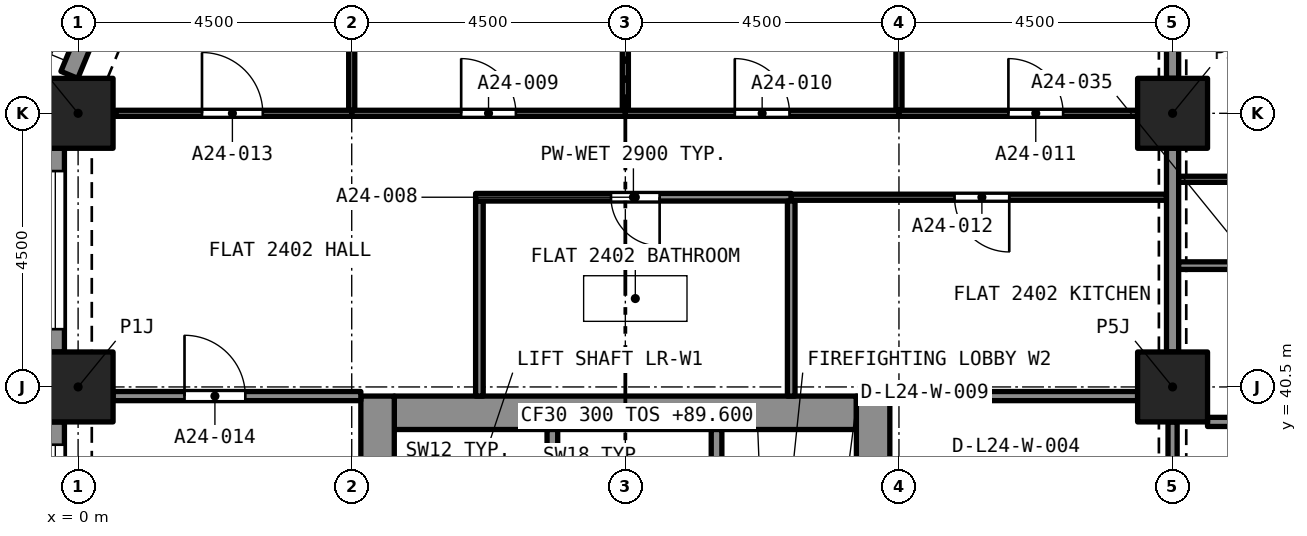
"""IFC4 building model, lengths in metres.
Left out: names, types, materials, properties, quantities, classifications, styles, units other than length and angle.
Written with IfcOpenShell. Run it as: python <this file> out.ifc"""

import sys

from ifc_helpers import new_model, si_unit, direction, frame, frame_2d, origin, origin_2d, place, context, subcontext, project, spatial, rectangle, extrude, element, fill, save


model = new_model("IFC4")
c1 = context("Model", 3, precision=1e-05, world=origin(), true_north=direction((0.0, 1.0)))
c2 = subcontext(c1, "Body", "Model", "MODEL_VIEW")
j1 = project(units=[si_unit("LENGTHUNIT", "METRE"), si_unit("PLANEANGLEUNIT", "RADIAN")], contexts=[c1])
p1 = place(None, origin())
s1 = spatial("IfcSite", under=j1, at=p1, CompositionType="ELEMENT")
p2 = place(p1, origin())
s2 = spatial("IfcBuilding", under=s1, at=p2, CompositionType="ELEMENT")
p3 = place(p2, frame((0.0, 0.0, 89.6)))
s3 = spatial("IfcBuildingStorey", under=s2, at=p3, CompositionType="ELEMENT", Elevation=89.6)
for number, where, z_axis, x_axis in (
    (1, (0.0, 40.5, 0.0), (0.0, 0.0, 1.0), (1.0, 0.0, 0.0)),
    (2, (18.0, 40.5, 0.0), (0.0, 0.0, 1.0), (1.0, 0.0, 0.0)),
    (3, (0.0, 45.0, 0.0), (0.0, 0.0, 1.0), (1.0, 0.0, 0.0)),
    (4, (18.0, 45.0, 0.0), (0.0, 0.0, 1.0), (1.0, 0.0, 0.0)),
):
    element("IfcColumn", number, at=place(p3, frame(where, z_axis=z_axis, x_axis=x_axis)), inside=s3, PredefinedType="COLUMN", context=c2, shape_type="SweptSolid", body=[
        extrude(rectangle(XDim=1.15, YDim=1.15, at=origin_2d()), origin(), (0.0, 0.0, 1.0), 3.2),
    ])
p4 = place(p3, frame((5.2, 40.075, 0.0), z_axis=(0.0, 0.0, 1.0), x_axis=(1.0, 0.0, 0.0)))
e5 = element("IfcWall", 5, at=p4, inside=s3, PredefinedType="SOLIDWALL", context=c2, shape_type="SweptSolid", body=[
    extrude(rectangle(XDim=7.6, YDim=0.55, at=frame_2d((3.8, 0.0))), origin(), (0.0, 0.0, 1.0), 3.2),
])
p5 = place(p3, frame((4.925, 27.15, 0.0), z_axis=(0.0, 0.0, 1.0), x_axis=(0.0, 1.0, 0.0)))
e6 = element("IfcWall", 6, at=p5, inside=s3, PredefinedType="SOLIDWALL", context=c2, shape_type="SweptSolid", body=[
    extrude(rectangle(XDim=13.2, YDim=0.55, at=frame_2d((6.6, 0.0))), origin(), (0.0, 0.0, 1.0), 3.2),
])
p6 = place(p5, frame((8.8, 0.0, 0.0)))
e7 = element("IfcOpeningElement", 7, at=p6, cuts=e6, PredefinedType="OPENING", context=c2, shape_type="SweptSolid", body=[
    extrude(rectangle(XDim=1.2, YDim=2.1, at=frame_2d((0.6, 1.05))), frame((0.0, 0.285, 0.0), z_axis=(0.0, -1.0, 0.0), x_axis=(1.0, 0.0, 0.0)), (0.0, 0.0, 1.0), 0.57),
])
p7 = place(p3, frame((13.075, 27.15, 0.0), z_axis=(0.0, 0.0, 1.0), x_axis=(0.0, 1.0, 0.0)))
e8 = element("IfcWall", 8, at=p7, inside=s3, PredefinedType="SOLIDWALL", context=c2, shape_type="SweptSolid", body=[
    extrude(rectangle(XDim=13.2, YDim=0.55, at=frame_2d((6.6, 0.0))), origin(), (0.0, 0.0, 1.0), 3.2),
])
p8 = place(p7, frame((10.95, 0.0, 0.0)))
e9 = element("IfcOpeningElement", 9, at=p8, cuts=e8, PredefinedType="OPENING", context=c2, shape_type="SweptSolid", body=[
    extrude(rectangle(XDim=1.1, YDim=2.1, at=frame_2d((0.55, 1.05))), frame((0.0, 0.285, 0.0), z_axis=(0.0, -1.0, 0.0), x_axis=(1.0, 0.0, 0.0)), (0.0, 0.0, 1.0), 0.57),
])
p9 = place(p7, frame((8.8, 0.0, 0.0)))
e10 = element("IfcOpeningElement", 10, at=p9, cuts=e8, PredefinedType="OPENING", context=c2, shape_type="SweptSolid", body=[
    extrude(rectangle(XDim=1.2, YDim=2.1, at=frame_2d((0.6, 1.05))), frame((0.0, 0.285, 0.0), z_axis=(0.0, -1.0, 0.0), x_axis=(1.0, 0.0, 0.0)), (0.0, 0.0, 1.0), 0.57),
])
p10 = place(p3, frame((-0.144, 45.632, 0.0), z_axis=(0.0, 0.0, 1.0), x_axis=(0.382723818695, 0.923862802911, 0.0)))
e11 = element("IfcWall", 11, at=p10, inside=s3, PredefinedType="SOLIDWALL", context=c2, shape_type="SweptSolid", body=[
    extrude(rectangle(XDim=2.164, YDim=0.3, at=frame_2d((1.082, 0.0))), origin(), (0.0, 0.0, 1.0), 3.2),
])
p11 = place(p10, frame((0.493, 0.0, 0.45)))
e12 = element("IfcOpeningElement", 12, at=p11, cuts=e11, PredefinedType="OPENING", context=c2, shape_type="SweptSolid", body=[
    extrude(rectangle(XDim=1.4, YDim=1.95, at=frame_2d((0.7, 0.975))), frame((0.0, 0.16, 0.0), z_axis=(0.0, -1.0, 0.0), x_axis=(1.0, 0.0, 0.0)), (0.0, 0.0, 1.0), 0.32),
])
p12 = place(p3, frame((-0.375, 41.075, 0.0), z_axis=(0.0, 0.0, 1.0), x_axis=(0.0, 1.0, 0.0)))
e13 = element("IfcWall", 13, at=p12, inside=s3, PredefinedType="SOLIDWALL", context=c2, shape_type="SweptSolid", body=[
    extrude(rectangle(XDim=3.35, YDim=0.3, at=frame_2d((1.675, 0.0))), origin(), (0.0, 0.0, 1.0), 3.2),
])
p13 = place(p12, frame((0.375, 0.0, 0.45)))
e14 = element("IfcOpeningElement", 14, at=p13, cuts=e13, PredefinedType="OPENING", context=c2, shape_type="SweptSolid", body=[
    extrude(rectangle(XDim=2.6, YDim=1.95, at=frame_2d((1.3, 0.975))), frame((0.0, 0.16, 0.0), z_axis=(0.0, -1.0, 0.0), x_axis=(1.0, 0.0, 0.0)), (0.0, 0.0, 1.0), 0.32),
])
p14 = place(p3, frame((-0.375, 36.575, 0.0), z_axis=(0.0, 0.0, 1.0), x_axis=(0.0, 1.0, 0.0)))
e15 = element("IfcWall", 15, at=p14, inside=s3, PredefinedType="SOLIDWALL", context=c2, shape_type="SweptSolid", body=[
    extrude(rectangle(XDim=3.35, YDim=0.3, at=frame_2d((1.675, 0.0))), origin(), (0.0, 0.0, 1.0), 3.2),
])
p15 = place(p14, frame((0.375, 0.0, 0.45)))
e16 = element("IfcOpeningElement", 16, at=p15, cuts=e15, PredefinedType="OPENING", context=c2, shape_type="SweptSolid", body=[
    extrude(rectangle(XDim=2.6, YDim=1.95, at=frame_2d((1.3, 0.975))), frame((0.0, 0.16, 0.0), z_axis=(0.0, -1.0, 0.0), x_axis=(1.0, 0.0, 0.0)), (0.0, 0.0, 1.0), 0.32),
])
p16 = place(p3, frame((6.6, 40.35, 0.0), z_axis=(0.0, 0.0, 1.0), x_axis=(0.0, 1.0, 0.0)))
e17 = element("IfcWall", 17, at=p16, inside=s3, PredefinedType="PARTITIONING", context=c2, shape_type="SweptSolid", body=[
    extrude(rectangle(XDim=3.208, YDim=0.125, at=frame_2d((1.604, 0.0))), origin(), (0.0, 0.0, 1.0), 2.9),
])
p17 = place(p3, frame((11.728, 43.62, 0.0), z_axis=(0.0, 0.0, 1.0), x_axis=(-1.0, 0.0, 0.0)))
e18 = element("IfcWall", 18, at=p17, inside=s3, PredefinedType="PARTITIONING", context=c2, shape_type="SweptSolid", body=[
    extrude(rectangle(XDim=5.19, YDim=0.125, at=frame_2d((2.595, 0.0))), origin(), (0.0, 0.0, 1.0), 2.9),
])
p18 = place(p17, frame((2.164, 0.0, 0.0)))
e19 = element("IfcOpeningElement", 19, at=p18, cuts=e18, PredefinedType="OPENING", context=c2, shape_type="SweptSolid", body=[
    extrude(rectangle(XDim=0.8, YDim=2.1, at=frame_2d((0.4, 1.05))), frame((0.0, 0.073, 0.0), z_axis=(0.0, -1.0, 0.0), x_axis=(1.0, 0.0, 0.0)), (0.0, 0.0, 1.0), 0.145),
])
p19 = place(p3, frame((11.728, 40.35, 0.0), z_axis=(0.0, 0.0, 1.0), x_axis=(0.0, 1.0, 0.0)))
e20 = element("IfcWall", 20, at=p19, inside=s3, PredefinedType="PARTITIONING", context=c2, shape_type="SweptSolid", body=[
    extrude(rectangle(XDim=3.208, YDim=0.125, at=frame_2d((1.604, 0.0))), origin(), (0.0, 0.0, 1.0), 2.9),
])
p20 = place(p3, frame((9.0, 45.05, 0.0), z_axis=(0.0, 0.0, 1.0), x_axis=(0.0, 1.0, 0.0)))
e21 = element("IfcWall", 21, at=p20, inside=s3, PredefinedType="PARTITIONING", context=c2, shape_type="SweptSolid", body=[
    extrude(rectangle(XDim=3.875, YDim=0.1, at=frame_2d((1.938, 0.0))), origin(), (0.0, 0.0, 1.0), 2.9),
])
p21 = place(p3, frame((4.5, 45.0, 0.0), z_axis=(0.0, 0.0, 1.0), x_axis=(1.0, 0.0, 0.0)))
e22 = element("IfcWall", 22, at=p21, inside=s3, PredefinedType="PARTITIONING", context=c2, shape_type="SweptSolid", body=[
    extrude(rectangle(XDim=4.5, YDim=0.1, at=frame_2d((2.25, 0.0))), origin(), (0.0, 0.0, 1.0), 2.9),
])
p22 = place(p21, frame((1.8, 0.0, 0.0)))
e23 = element("IfcOpeningElement", 23, at=p22, cuts=e22, PredefinedType="OPENING", context=c2, shape_type="SweptSolid", body=[
    extrude(rectangle(XDim=0.9, YDim=2.1, at=frame_2d((0.45, 1.05))), frame((0.0, 0.06, 0.0), z_axis=(0.0, -1.0, 0.0), x_axis=(1.0, 0.0, 0.0)), (0.0, 0.0, 1.0), 0.12),
])
p23 = place(p3, frame((4.5, 45.05, 0.0), z_axis=(0.0, 0.0, 1.0), x_axis=(0.0, 1.0, 0.0)))
e24 = element("IfcWall", 24, at=p23, inside=s3, PredefinedType="PARTITIONING", context=c2, shape_type="SweptSolid", body=[
    extrude(rectangle(XDim=3.828, YDim=0.1, at=frame_2d((1.914, 0.0))), origin(), (0.0, 0.0, 1.0), 2.9),
])
p24 = place(p3, frame((13.5, 45.05, 0.0), z_axis=(0.0, 0.0, 1.0), x_axis=(0.0, 1.0, 0.0)))
e25 = element("IfcWall", 25, at=p24, inside=s3, PredefinedType="PARTITIONING", context=c2, shape_type="SweptSolid", body=[
    extrude(rectangle(XDim=3.875, YDim=0.1, at=frame_2d((1.938, 0.0))), origin(), (0.0, 0.0, 1.0), 2.9),
])
p25 = place(p3, frame((9.0, 45.0, 0.0), z_axis=(0.0, 0.0, 1.0), x_axis=(1.0, 0.0, 0.0)))
e26 = element("IfcWall", 26, at=p25, inside=s3, PredefinedType="PARTITIONING", context=c2, shape_type="SweptSolid", body=[
    extrude(rectangle(XDim=4.5, YDim=0.1, at=frame_2d((2.25, 0.0))), origin(), (0.0, 0.0, 1.0), 2.9),
])
p26 = place(p25, frame((1.8, 0.0, 0.0)))
e27 = element("IfcOpeningElement", 27, at=p26, cuts=e26, PredefinedType="OPENING", context=c2, shape_type="SweptSolid", body=[
    extrude(rectangle(XDim=0.9, YDim=2.1, at=frame_2d((0.45, 1.05))), frame((0.0, 0.06, 0.0), z_axis=(0.0, -1.0, 0.0), x_axis=(1.0, 0.0, 0.0)), (0.0, 0.0, 1.0), 0.12),
])
p27 = place(p3, frame((13.5, 45.0, 0.0), z_axis=(0.0, 0.0, 1.0), x_axis=(1.0, 0.0, 0.0)))
e28 = element("IfcWall", 28, at=p27, inside=s3, PredefinedType="PARTITIONING", context=c2, shape_type="SweptSolid", body=[
    extrude(rectangle(XDim=3.925, YDim=0.1, at=frame_2d((1.962, 0.0))), origin(), (0.0, 0.0, 1.0), 2.9),
])
p28 = place(p27, frame((1.8, 0.0, 0.0)))
e29 = element("IfcOpeningElement", 29, at=p28, cuts=e28, PredefinedType="OPENING", context=c2, shape_type="SweptSolid", body=[
    extrude(rectangle(XDim=0.9, YDim=2.1, at=frame_2d((0.45, 1.05))), frame((0.0, 0.06, 0.0), z_axis=(0.0, -1.0, 0.0), x_axis=(1.0, 0.0, 0.0)), (0.0, 0.0, 1.0), 0.12),
])
p29 = place(p3, frame((18.0, 45.575, 0.0), z_axis=(0.0, 0.0, 1.0), x_axis=(0.0, 1.0, 0.0)))
e30 = element("IfcWall", 30, at=p29, inside=s3, PredefinedType="PARTITIONING", context=c2, shape_type="SweptSolid", body=[
    extrude(rectangle(XDim=3.35, YDim=0.2, at=frame_2d((1.675, 0.0))), origin(), (0.0, 0.0, 1.0), 2.38),
])
p30 = place(p3, frame((17.9, 43.62, 0.0), z_axis=(0.0, 0.0, 1.0), x_axis=(-1.0, 0.0, 0.0)))
e31 = element("IfcWall", 31, at=p30, inside=s3, PredefinedType="PARTITIONING", context=c2, shape_type="SweptSolid", body=[
    extrude(rectangle(XDim=6.172, YDim=0.1, at=frame_2d((3.086, 0.0))), origin(), (0.0, 0.0, 1.0), 2.9),
])
p31 = place(p30, frame((2.586, 0.0, 0.0)))
e32 = element("IfcOpeningElement", 32, at=p31, cuts=e31, PredefinedType="OPENING", context=c2, shape_type="SweptSolid", body=[
    extrude(rectangle(XDim=0.9, YDim=2.1, at=frame_2d((0.45, 1.05))), frame((0.0, 0.06, 0.0), z_axis=(0.0, -1.0, 0.0), x_axis=(1.0, 0.0, 0.0)), (0.0, 0.0, 1.0), 0.12),
])
p32 = place(p3, frame((0.622, 45.0, 0.0), z_axis=(0.0, 0.0, 1.0), x_axis=(1.0, 0.0, 0.0)))
e33 = element("IfcWall", 33, at=p32, inside=s3, PredefinedType="PARTITIONING", context=c2, shape_type="SweptSolid", body=[
    extrude(rectangle(XDim=3.878, YDim=0.1, at=frame_2d((1.939, 0.0))), origin(), (0.0, 0.0, 1.0), 2.9),
])
p33 = place(p32, frame((1.415, 0.0, 0.0)))
e34 = element("IfcOpeningElement", 34, at=p33, cuts=e33, PredefinedType="OPENING", context=c2, shape_type="SweptSolid", body=[
    extrude(rectangle(XDim=1.0, YDim=2.1, at=frame_2d((0.5, 1.05))), frame((0.0, 0.06, 0.0), z_axis=(0.0, -1.0, 0.0), x_axis=(1.0, 0.0, 0.0)), (0.0, 0.0, 1.0), 0.12),
])
p34 = place(p3, frame((0.575, 40.35, 0.0), z_axis=(0.0, 0.0, 1.0), x_axis=(1.0, 0.0, 0.0)))
e35 = element("IfcWall", 35, at=p34, inside=s3, PredefinedType="PARTITIONING", context=c2, shape_type="SweptSolid", body=[
    extrude(rectangle(XDim=4.075, YDim=0.15, at=frame_2d((2.038, 0.0))), origin(), (0.0, 0.0, 1.0), 2.9),
])
p35 = place(p34, frame((1.175, 0.0, 0.0)))
e36 = element("IfcOpeningElement", 36, at=p35, cuts=e35, PredefinedType="OPENING", context=c2, shape_type="SweptSolid", body=[
    extrude(rectangle(XDim=1.0, YDim=2.1, at=frame_2d((0.5, 1.05))), frame((0.0, 0.085, 0.0), z_axis=(0.0, -1.0, 0.0), x_axis=(1.0, 0.0, 0.0)), (0.0, 0.0, 1.0), 0.17),
])
p36 = place(p3, frame((18.0, 41.075, 0.0), z_axis=(0.0, 0.0, 1.0), x_axis=(0.0, 1.0, 0.0)))
e37 = element("IfcWall", 37, at=p36, inside=s3, PredefinedType="PARTITIONING", context=c2, shape_type="SweptSolid", body=[
    extrude(rectangle(XDim=3.35, YDim=0.2, at=frame_2d((1.675, 0.0))), origin(), (0.0, 0.0, 1.0), 2.38),
])
p37 = place(p3, frame((13.35, 40.35, 0.0), z_axis=(0.0, 0.0, 1.0), x_axis=(1.0, 0.0, 0.0)))
e38 = element("IfcWall", 38, at=p37, inside=s3, PredefinedType="PARTITIONING", context=c2, shape_type="SweptSolid", body=[
    extrude(rectangle(XDim=4.075, YDim=0.15, at=frame_2d((2.038, 0.0))), origin(), (0.0, 0.0, 1.0), 2.9),
])
p38 = place(p3, frame((20.762, 42.495, 0.0), z_axis=(0.0, 0.0, 1.0), x_axis=(-1.0, 0.0, 0.0)))
e39 = element("IfcWall", 39, at=p38, inside=s3, PredefinedType="PARTITIONING", context=c2, shape_type="SweptSolid", body=[
    extrude(rectangle(XDim=2.662, YDim=0.125, at=frame_2d((1.331, 0.0))), origin(), (0.0, 0.0, 1.0), 2.75),
])
p39 = place(p38, frame((1.012, 0.0, 0.0)))
e40 = element("IfcOpeningElement", 40, at=p39, cuts=e39, PredefinedType="OPENING", context=c2, shape_type="SweptSolid", body=[
    extrude(rectangle(XDim=0.8, YDim=2.1, at=frame_2d((0.4, 1.05))), frame((0.0, 0.073, 0.0), z_axis=(0.0, -1.0, 0.0), x_axis=(1.0, 0.0, 0.0)), (0.0, 0.0, 1.0), 0.145),
])
p40 = place(p3, frame((18.575, 39.925, 0.0), z_axis=(0.0, 0.0, 1.0), x_axis=(1.0, 0.0, 0.0)))
e41 = element("IfcWall", 41, at=p40, inside=s3, PredefinedType="PARTITIONING", context=c2, shape_type="SweptSolid", body=[
    extrude(rectangle(XDim=2.125, YDim=0.15, at=frame_2d((1.062, 0.0))), origin(), (0.0, 0.0, 1.0), 2.75),
])
p41 = place(p3, frame((18.1, 43.915, 0.0), z_axis=(0.0, 0.0, 1.0), x_axis=(1.0, 0.0, 0.0)))
e42 = element("IfcWall", 42, at=p41, inside=s3, PredefinedType="PARTITIONING", context=c2, shape_type="SweptSolid", body=[
    extrude(rectangle(XDim=4.4, YDim=0.1, at=frame_2d((2.2, 0.0))), origin(), (0.0, 0.0, 1.0), 2.75),
])
p42 = place(p41, frame((1.65, 0.0, 0.0)))
e43 = element("IfcOpeningElement", 43, at=p42, cuts=e42, PredefinedType="OPENING", context=c2, shape_type="SweptSolid", body=[
    extrude(rectangle(XDim=1.0, YDim=2.1, at=frame_2d((0.5, 1.05))), frame((0.0, 0.06, 0.0), z_axis=(0.0, -1.0, 0.0), x_axis=(1.0, 0.0, 0.0)), (0.0, 0.0, 1.0), 0.12),
])
p43 = place(p3, frame((18.0, 39.925, 0.0), z_axis=(0.0, 0.0, 1.0), x_axis=(0.0, -1.0, 0.0)))
e44 = element("IfcWall", 44, at=p43, inside=s3, PredefinedType="PARTITIONING", context=c2, shape_type="SweptSolid", body=[
    extrude(rectangle(XDim=3.35, YDim=0.15, at=frame_2d((1.675, 0.0))), origin(), (0.0, 0.0, 1.0), 2.38),
])
p44 = place(p43, frame((1.075, 0.0, 0.0)))
e45 = element("IfcOpeningElement", 45, at=p44, cuts=e44, PredefinedType="OPENING", context=c2, shape_type="SweptSolid", body=[
    extrude(rectangle(XDim=1.2, YDim=2.1, at=frame_2d((0.6, 1.05))), frame((0.0, 0.085, 0.0), z_axis=(0.0, -1.0, 0.0), x_axis=(1.0, 0.0, 0.0)), (0.0, 0.0, 1.0), 0.17),
])
p45 = place(p3, frame((7.8, 37.5, 0.0), z_axis=(0.0, 0.0, 1.0), x_axis=(0.0, 1.0, 0.0)))
e46 = element("IfcWall", 46, at=p45, inside=s3, PredefinedType="SOLIDWALL", context=c2, shape_type="SweptSolid", body=[
    extrude(rectangle(XDim=2.3, YDim=0.175, at=frame_2d((1.15, 0.0))), origin(), (0.0, 0.0, 1.0), 2.9),
])
p46 = place(p3, frame((10.5, 37.5, 0.0), z_axis=(0.0, 0.0, 1.0), x_axis=(0.0, 1.0, 0.0)))
e47 = element("IfcWall", 47, at=p46, inside=s3, PredefinedType="SOLIDWALL", context=c2, shape_type="SweptSolid", body=[
    extrude(rectangle(XDim=2.3, YDim=0.175, at=frame_2d((1.15, 0.0))), origin(), (0.0, 0.0, 1.0), 2.9),
])
p47 = place(p46, frame((0.65, 0.0, 0.0)))
e48 = element("IfcOpeningElement", 48, at=p47, cuts=e47, PredefinedType="OPENING", context=c2, shape_type="SweptSolid", body=[
    extrude(rectangle(XDim=1.0, YDim=2.1, at=frame_2d((0.5, 1.05))), frame((0.0, 0.097, 0.0), z_axis=(0.0, -1.0, 0.0), x_axis=(1.0, 0.0, 0.0)), (0.0, 0.0, 1.0), 0.195),
])
p48 = place(p13, origin())
e49 = element("IfcWindow", 49, at=p48, inside=s3, PartitioningType="SINGLE_PANEL", PredefinedType="WINDOW", context=c2, shape_type="SweptSolid", body=[
    extrude(rectangle(XDim=2.6, YDim=1.95, at=frame_2d((1.3, 0.975))), frame((0.0, 0.03, 0.0), z_axis=(0.0, -1.0, 0.0), x_axis=(1.0, 0.0, 0.0)), (0.0, 0.0, 1.0), 0.06),
])
fill(e14, e49)
p49 = place(p15, origin())
e50 = element("IfcWindow", 50, at=p49, inside=s3, PartitioningType="SINGLE_PANEL", PredefinedType="WINDOW", context=c2, shape_type="SweptSolid", body=[
    extrude(rectangle(XDim=2.6, YDim=1.95, at=frame_2d((1.3, 0.975))), frame((0.0, 0.03, 0.0), z_axis=(0.0, -1.0, 0.0), x_axis=(1.0, 0.0, 0.0)), (0.0, 0.0, 1.0), 0.06),
])
fill(e16, e50)
p50 = place(p18, origin())
e51 = element("IfcDoor", 51, at=p50, inside=s3, OperationType="SINGLE_SWING_LEFT", PredefinedType="DOOR", context=c2, shape_type="SweptSolid", body=[
    extrude(rectangle(XDim=0.8, YDim=2.1, at=frame_2d((0.4, 1.05))), frame((0.0, 0.025, 0.0), z_axis=(0.0, -1.0, 0.0), x_axis=(1.0, 0.0, 0.0)), (0.0, 0.0, 1.0), 0.05),
])
fill(e19, e51)
p51 = place(p22, origin())
e52 = element("IfcDoor", 52, at=p51, inside=s3, OperationType="SINGLE_SWING_RIGHT", PredefinedType="DOOR", context=c2, shape_type="SweptSolid", body=[
    extrude(rectangle(XDim=0.9, YDim=2.1, at=frame_2d((0.45, 1.05))), frame((0.0, 0.025, 0.0), z_axis=(0.0, -1.0, 0.0), x_axis=(1.0, 0.0, 0.0)), (0.0, 0.0, 1.0), 0.05),
])
fill(e23, e52)
p52 = place(p26, origin())
e53 = element("IfcDoor", 53, at=p52, inside=s3, OperationType="SINGLE_SWING_LEFT", PredefinedType="DOOR", context=c2, shape_type="SweptSolid", body=[
    extrude(rectangle(XDim=0.9, YDim=2.1, at=frame_2d((0.45, 1.05))), frame((0.0, 0.025, 0.0), z_axis=(0.0, -1.0, 0.0), x_axis=(1.0, 0.0, 0.0)), (0.0, 0.0, 1.0), 0.05),
])
fill(e27, e53)
p53 = place(p28, origin())
e54 = element("IfcDoor", 54, at=p53, inside=s3, OperationType="SINGLE_SWING_RIGHT", PredefinedType="DOOR", context=c2, shape_type="SweptSolid", body=[
    extrude(rectangle(XDim=0.9, YDim=2.1, at=frame_2d((0.45, 1.05))), frame((0.0, 0.025, 0.0), z_axis=(0.0, -1.0, 0.0), x_axis=(1.0, 0.0, 0.0)), (0.0, 0.0, 1.0), 0.05),
])
fill(e29, e54)
p54 = place(p31, origin())
e55 = element("IfcDoor", 55, at=p54, inside=s3, OperationType="SINGLE_SWING_LEFT", PredefinedType="DOOR", context=c2, shape_type="SweptSolid", body=[
    extrude(rectangle(XDim=0.9, YDim=2.1, at=frame_2d((0.45, 1.05))), frame((0.0, 0.025, 0.0), z_axis=(0.0, -1.0, 0.0), x_axis=(1.0, 0.0, 0.0)), (0.0, 0.0, 1.0), 0.05),
])
fill(e32, e55)
p55 = place(p33, origin())
e56 = element("IfcDoor", 56, at=p55, inside=s3, OperationType="SINGLE_SWING_LEFT", PredefinedType="DOOR", context=c2, shape_type="SweptSolid", body=[
    extrude(rectangle(XDim=1.0, YDim=2.1, at=frame_2d((0.5, 1.05))), frame((0.0, 0.025, 0.0), z_axis=(0.0, -1.0, 0.0), x_axis=(1.0, 0.0, 0.0)), (0.0, 0.0, 1.0), 0.05),
])
fill(e34, e56)
p56 = place(p35, origin())
e57 = element("IfcDoor", 57, at=p56, inside=s3, OperationType="SINGLE_SWING_LEFT", PredefinedType="DOOR", context=c2, shape_type="SweptSolid", body=[
    extrude(rectangle(XDim=1.0, YDim=2.1, at=frame_2d((0.5, 1.05))), frame((0.0, 0.025, 0.0), z_axis=(0.0, -1.0, 0.0), x_axis=(1.0, 0.0, 0.0)), (0.0, 0.0, 1.0), 0.05),
])
fill(e36, e57)
save(model, sys.argv[1])
